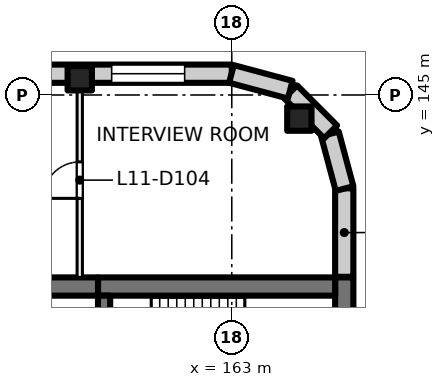
"""IFC4 building model, lengths in metres.
Left out: names, types, materials, properties, quantities, classifications, styles, units other than length and angle.
Written with IfcOpenShell. Run it as: python <this file> out.ifc"""

import sys

from ifc_helpers import new_model, si_unit, direction, frame, frame_2d, origin, origin_2d, place, context, subcontext, project, spatial, rectangle, extrude, element, fill, save


model = new_model("IFC4")
c1 = context("Model", 3, precision=1e-05, world=origin(), true_north=direction((0.0, 1.0)))
c2 = subcontext(c1, "Body", "Model", "MODEL_VIEW")
j1 = project(units=[si_unit("LENGTHUNIT", "METRE"), si_unit("PLANEANGLEUNIT", "RADIAN")], contexts=[c1])
p1 = place(None, origin())
s1 = spatial("IfcSite", under=j1, at=p1, CompositionType="ELEMENT")
p2 = place(p1, origin())
s2 = spatial("IfcBuilding", under=s1, at=p2, CompositionType="ELEMENT")
p3 = place(p2, frame((0.0, 0.0, 51.5)))
s3 = spatial("IfcBuildingStorey", under=s2, at=p3, CompositionType="ELEMENT", Elevation=51.5)
for number, where, z_axis, x_axis in (
    (1, (165.223, 144.223, 0.0), (0.0, 0.0, 1.0), (1.0, 0.0, 0.0)),
    (2, (158.0, 145.55, 0.0), (0.0, 0.0, 1.0), (1.0, 0.0, 0.0)),
):
    element("IfcColumn", number, at=place(p3, frame(where, z_axis=z_axis, x_axis=x_axis)), inside=s3, PredefinedType="COLUMN", context=c2, shape_type="SweptSolid", body=[
        extrude(rectangle(XDim=0.8, YDim=0.8, at=origin_2d()), origin(), (0.0, 0.0, 1.0), 4.0),
    ])
p4 = place(p3, frame((166.7, 139.0, 0.0), z_axis=(0.0, 0.0, 1.0), x_axis=(0.0, -1.0, 0.0)))
e3 = element("IfcWall", 3, at=p4, inside=s3, PredefinedType="SHEAR", context=c2, shape_type="SweptSolid", body=[
    extrude(rectangle(XDim=3.8, YDim=0.6, at=frame_2d((1.9, 0.0))), origin(), (0.0, 0.0, 1.0), 4.0),
])
p5 = place(p3, frame((166.4, 138.7, 0.0), z_axis=(0.0, 0.0, 1.0), x_axis=(-1.0, 0.0, 0.0)))
e4 = element("IfcWall", 4, at=p5, inside=s3, PredefinedType="SHEAR", context=c2, shape_type="SweptSolid", body=[
    extrude(rectangle(XDim=7.8, YDim=0.6, at=frame_2d((3.9, 0.0))), origin(), (0.0, 0.0, 1.0), 4.0),
])
p6 = place(p3, frame((158.6, 138.7, 0.0), z_axis=(0.0, 0.0, 1.0), x_axis=(-1.0, 0.0, 0.0)))
e5 = element("IfcWall", 5, at=p6, inside=s3, PredefinedType="SHEAR", context=c2, shape_type="SweptSolid", body=[
    extrude(rectangle(XDim=4.6, YDim=0.6, at=frame_2d((2.3, 0.0))), origin(), (0.0, 0.0, 1.0), 4.0),
])
p7 = place(p3, frame((158.8, 138.4, 0.0), z_axis=(0.0, 0.0, 1.0), x_axis=(0.0, -1.0, 0.0)))
e6 = element("IfcWall", 6, at=p7, inside=s3, PredefinedType="SHEAR", context=c2, shape_type="SweptSolid", body=[
    extrude(rectangle(XDim=2.8, YDim=0.4, at=frame_2d((1.4, 0.0))), origin(), (0.0, 0.0, 1.0), 4.0),
])
p8 = place(p7, frame((0.9, 0.0, 0.0)))
e7 = element("IfcOpeningElement", 7, at=p8, cuts=e6, PredefinedType="OPENING", context=c2, shape_type="SweptSolid", body=[
    extrude(rectangle(XDim=1.0, YDim=2.1, at=frame_2d((0.5, 1.05))), frame((0.0, 0.21, 0.0), z_axis=(0.0, -1.0, 0.0), x_axis=(1.0, 0.0, 0.0)), (0.0, 0.0, 1.0), 0.42),
])
p9 = place(p3, frame((131.07, 145.7, 0.0), z_axis=(0.0, 0.0, 1.0), x_axis=(1.0, 0.0, 0.0)))
e8 = element("IfcWall", 8, at=p9, inside=s3, PredefinedType="SOLIDWALL", context=c2, shape_type="SweptSolid", body=[
    extrude(rectangle(XDim=31.93, YDim=0.6, at=frame_2d((15.965, 0.0))), origin(), (0.0, 0.0, 1.0), 3.625),
])
p10 = place(p9, frame((0.98, 0.0, 0.9)))
e9 = element("IfcOpeningElement", 9, at=p10, cuts=e8, PredefinedType="OPENING", context=c2, shape_type="SweptSolid", body=[
    extrude(rectangle(XDim=2.4, YDim=2.4, at=frame_2d((1.2, 1.2))), frame((0.0, 0.31, 0.0), z_axis=(0.0, -1.0, 0.0), x_axis=(1.0, 0.0, 0.0)), (0.0, 0.0, 1.0), 0.62),
])
p11 = place(p9, frame((5.48, 0.0, 0.9)))
e10 = element("IfcOpeningElement", 10, at=p11, cuts=e8, PredefinedType="OPENING", context=c2, shape_type="SweptSolid", body=[
    extrude(rectangle(XDim=2.4, YDim=2.4, at=frame_2d((1.2, 1.2))), frame((0.0, 0.31, 0.0), z_axis=(0.0, -1.0, 0.0), x_axis=(1.0, 0.0, 0.0)), (0.0, 0.0, 1.0), 0.62),
])
p12 = place(p9, frame((9.98, 0.0, 0.9)))
e11 = element("IfcOpeningElement", 11, at=p12, cuts=e8, PredefinedType="OPENING", context=c2, shape_type="SweptSolid", body=[
    extrude(rectangle(XDim=2.4, YDim=2.4, at=frame_2d((1.2, 1.2))), frame((0.0, 0.31, 0.0), z_axis=(0.0, -1.0, 0.0), x_axis=(1.0, 0.0, 0.0)), (0.0, 0.0, 1.0), 0.62),
])
p13 = place(p9, frame((14.48, 0.0, 0.9)))
e12 = element("IfcOpeningElement", 12, at=p13, cuts=e8, PredefinedType="OPENING", context=c2, shape_type="SweptSolid", body=[
    extrude(rectangle(XDim=2.4, YDim=2.4, at=frame_2d((1.2, 1.2))), frame((0.0, 0.31, 0.0), z_axis=(0.0, -1.0, 0.0), x_axis=(1.0, 0.0, 0.0)), (0.0, 0.0, 1.0), 0.62),
])
p14 = place(p9, frame((18.98, 0.0, 0.9)))
e13 = element("IfcOpeningElement", 13, at=p14, cuts=e8, PredefinedType="OPENING", context=c2, shape_type="SweptSolid", body=[
    extrude(rectangle(XDim=2.4, YDim=2.4, at=frame_2d((1.2, 1.2))), frame((0.0, 0.31, 0.0), z_axis=(0.0, -1.0, 0.0), x_axis=(1.0, 0.0, 0.0)), (0.0, 0.0, 1.0), 0.62),
])
p15 = place(p9, frame((23.48, 0.0, 0.9)))
e14 = element("IfcOpeningElement", 14, at=p15, cuts=e8, PredefinedType="OPENING", context=c2, shape_type="SweptSolid", body=[
    extrude(rectangle(XDim=2.4, YDim=2.4, at=frame_2d((1.2, 1.2))), frame((0.0, 0.31, 0.0), z_axis=(0.0, -1.0, 0.0), x_axis=(1.0, 0.0, 0.0)), (0.0, 0.0, 1.0), 0.62),
])
p16 = place(p9, frame((27.98, 0.0, 0.9)))
e15 = element("IfcOpeningElement", 15, at=p16, cuts=e8, PredefinedType="OPENING", context=c2, shape_type="SweptSolid", body=[
    extrude(rectangle(XDim=2.4, YDim=2.4, at=frame_2d((1.2, 1.2))), frame((0.0, 0.31, 0.0), z_axis=(0.0, -1.0, 0.0), x_axis=(1.0, 0.0, 0.0)), (0.0, 0.0, 1.0), 0.62),
])
p17 = place(p3, frame((166.7, 141.93, 0.0), z_axis=(0.0, 0.0, 1.0), x_axis=(0.0, -1.0, 0.0)))
e16 = element("IfcWall", 16, at=p17, inside=s3, PredefinedType="SOLIDWALL", context=c2, shape_type="SweptSolid", body=[
    extrude(rectangle(XDim=2.91, YDim=0.6, at=frame_2d((1.455, 0.0))), origin(), (0.0, 0.0, 1.0), 3.625),
])
for number, where, z_axis, x_axis in (
    (17, (166.229, 143.719, 0.0), (0.0, 0.0, 1.0), (0.259, -0.966, 0.0)),
    (18, (164.936, 145.104, 0.0), (0.0, 0.0, 1.0), (0.707, -0.707, 0.0)),
):
    element("IfcWall", number, at=place(p3, frame(where, z_axis=z_axis, x_axis=x_axis)), inside=s3, PredefinedType="SOLIDWALL", context=c2, shape_type="SweptSolid", body=[
        extrude(rectangle(XDim=1.861, YDim=0.6, at=frame_2d((0.93, 0.0))), origin(), (0.0, 0.0, 1.0), 3.625),
    ])
p18 = place(p3, frame((162.99, 145.692, 0.0), z_axis=(0.0, 0.0, 1.0), x_axis=(0.965920269068, -0.258839784042, 0.0)))
e19 = element("IfcWall", 19, at=p18, inside=s3, PredefinedType="SOLIDWALL", context=c2, shape_type="SweptSolid", body=[
    extrude(rectangle(XDim=2.0, YDim=0.6, at=frame_2d((1.0, 0.0))), origin(), (0.0, 0.0, 1.0), 3.625),
])
p19 = place(p3, frame((158.0, 139.0, 0.0), z_axis=(0.0, 0.0, 1.0), x_axis=(0.0, 1.0, 0.0)))
e20 = element("IfcWall", 20, at=p19, inside=s3, PredefinedType="PARTITIONING", context=c2, shape_type="SweptSolid", body=[
    extrude(rectangle(XDim=6.4, YDim=0.175, at=frame_2d((3.2, 0.0))), origin(), (0.0, 0.0, 1.0), 3.625),
])
p20 = place(p19, frame((2.6, 0.0, 0.0)))
e21 = element("IfcOpeningElement", 21, at=p20, cuts=e20, PredefinedType="OPENING", context=c2, shape_type="SweptSolid", body=[
    extrude(rectangle(XDim=1.2, YDim=2.1, at=frame_2d((0.6, 1.05))), frame((0.0, 0.097, 0.0), z_axis=(0.0, -1.0, 0.0), x_axis=(1.0, 0.0, 0.0)), (0.0, 0.0, 1.0), 0.195),
])
p21 = place(p16, origin())
e22 = element("IfcWindow", 22, at=p21, inside=s3, PartitioningType="SINGLE_PANEL", PredefinedType="WINDOW", context=c2, shape_type="SweptSolid", body=[
    extrude(rectangle(XDim=2.4, YDim=2.4, at=frame_2d((1.2, 1.2))), frame((0.0, 0.03, 0.0), z_axis=(0.0, -1.0, 0.0), x_axis=(1.0, 0.0, 0.0)), (0.0, 0.0, 1.0), 0.06),
])
fill(e15, e22)
p22 = place(p20, origin())
e23 = element("IfcDoor", 23, at=p22, inside=s3, OperationType="DOUBLE_DOOR_SINGLE_SWING", PredefinedType="DOOR", context=c2, shape_type="SweptSolid", body=[
    extrude(rectangle(XDim=1.2, YDim=2.1, at=frame_2d((0.6, 1.05))), frame((0.0, 0.025, 0.0), z_axis=(0.0, -1.0, 0.0), x_axis=(1.0, 0.0, 0.0)), (0.0, 0.0, 1.0), 0.05),
])
fill(e21, e23)
save(model, sys.argv[1])
